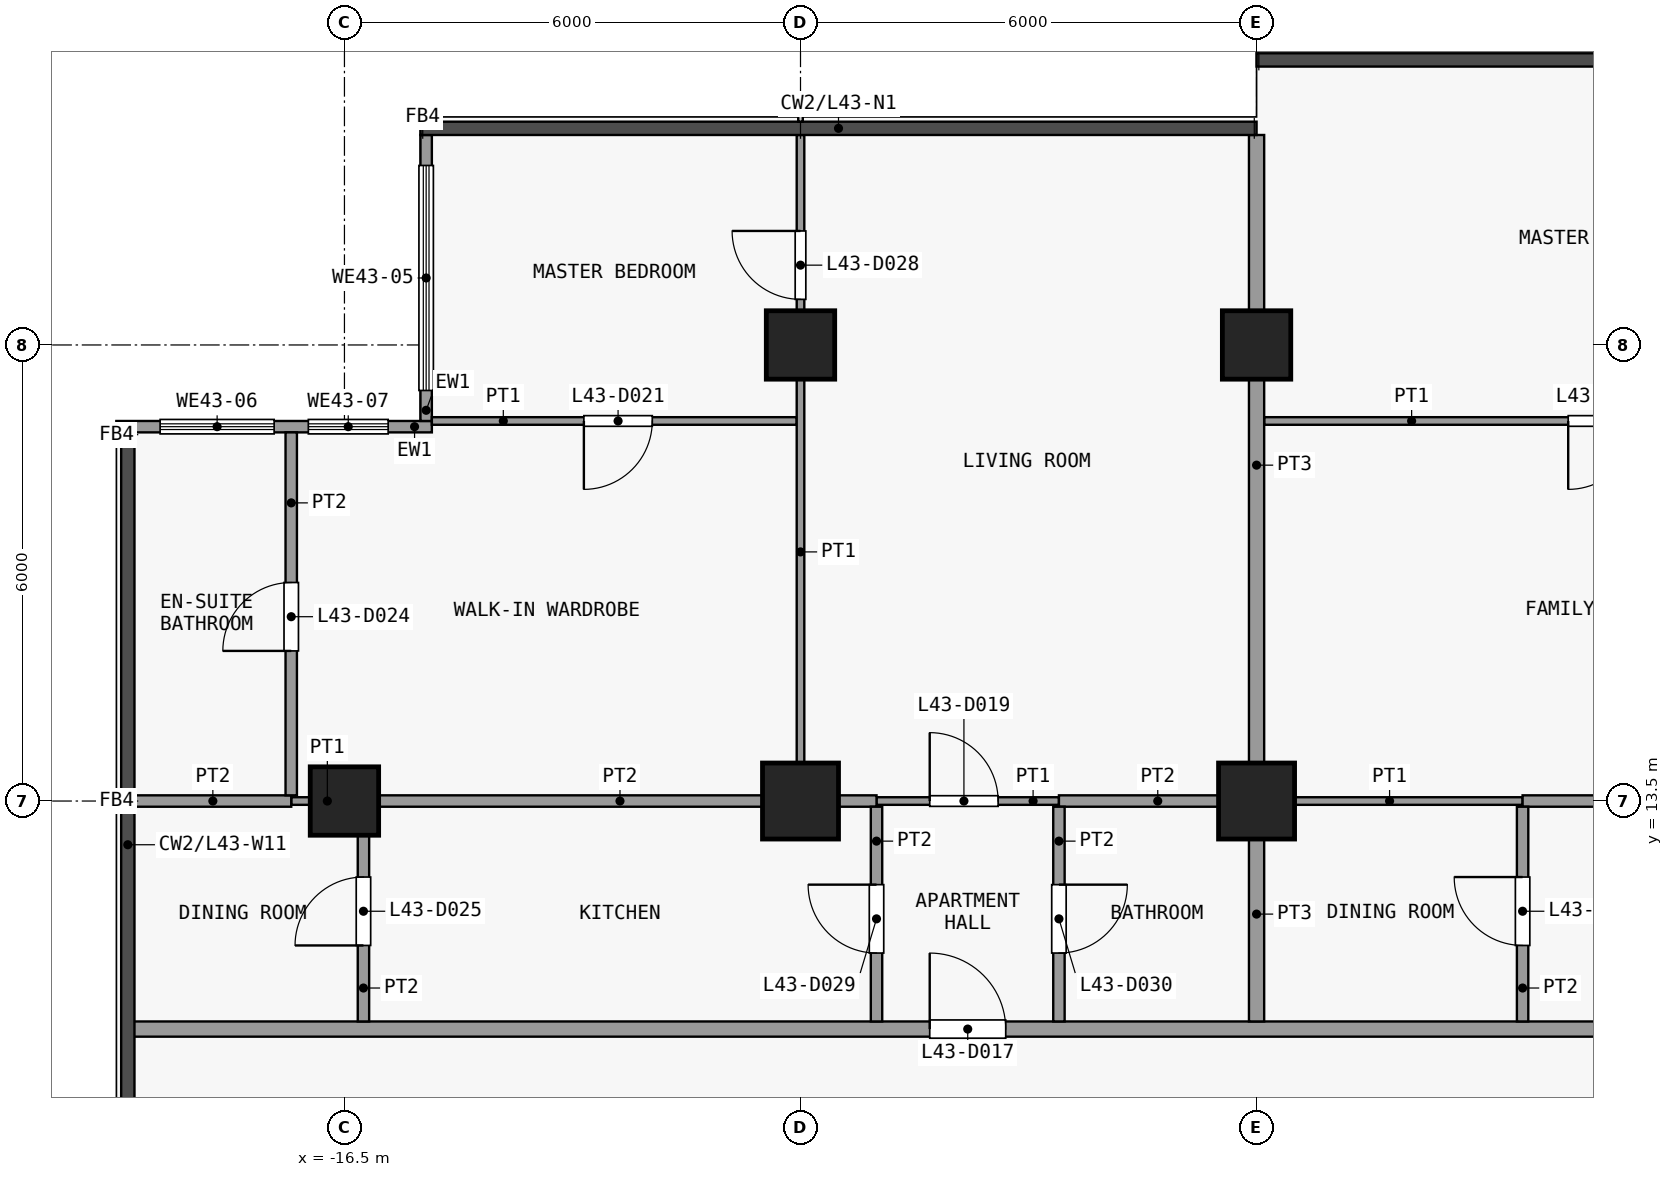
"""IFC4 building model, lengths in metres.
Left out: names, types, materials, properties, quantities, classifications, styles, units other than length and angle.
Written with IfcOpenShell. Run it as: python <this file> out.ifc"""

import sys

from ifc_helpers import new_model, si_unit, direction, frame, frame_2d, origin, origin_2d, place, context, subcontext, project, spatial, rectangle, extrude, element, fill, save


model = new_model("IFC4")
c1 = context("Model", 3, precision=1e-05, world=origin(), true_north=direction((0.0, 1.0)))
c2 = subcontext(c1, "Body", "Model", "MODEL_VIEW")
j1 = project(units=[si_unit("LENGTHUNIT", "METRE"), si_unit("PLANEANGLEUNIT", "RADIAN")], contexts=[c1])
p1 = place(None, origin())
s1 = spatial("IfcSite", under=j1, at=p1, CompositionType="ELEMENT")
p2 = place(p1, origin())
s2 = spatial("IfcBuilding", under=s1, at=p2, CompositionType="ELEMENT")
p3 = place(p2, frame((0.0, 0.0, 174.5)))
s3 = spatial("IfcBuildingStorey", under=s2, at=p3, CompositionType="ELEMENT", Elevation=174.5)
p4 = place(p3, frame((-16.5, 13.5, 0.0), z_axis=(0.0, 0.0, 1.0), x_axis=(1.0, 0.0, 0.0)))
e1 = element("IfcColumn", 1, at=p4, inside=s3, PredefinedType="COLUMN", context=c2, shape_type="SweptSolid", body=[
    extrude(rectangle(XDim=0.9, YDim=0.9, at=origin_2d()), origin(), (0.0, 0.0, 1.0), 3.6),
])
p5 = place(p3, frame((-10.5, 13.5, 0.0), z_axis=(0.0, 0.0, 1.0), x_axis=(1.0, 0.0, 0.0)))
e2 = element("IfcColumn", 2, at=p5, inside=s3, PredefinedType="COLUMN", context=c2, shape_type="SweptSolid", body=[
    extrude(rectangle(XDim=1.0, YDim=1.0, at=origin_2d()), origin(), (0.0, 0.0, 1.0), 3.6),
])
p6 = place(p3, frame((-10.5, 19.5, 0.0), z_axis=(0.0, 0.0, 1.0), x_axis=(1.0, 0.0, 0.0)))
e3 = element("IfcColumn", 3, at=p6, inside=s3, PredefinedType="COLUMN", context=c2, shape_type="SweptSolid", body=[
    extrude(rectangle(XDim=0.9, YDim=0.9, at=origin_2d()), origin(), (0.0, 0.0, 1.0), 3.6),
])
p7 = place(p3, frame((-4.5, 13.5, 0.0), z_axis=(0.0, 0.0, 1.0), x_axis=(1.0, 0.0, 0.0)))
e4 = element("IfcColumn", 4, at=p7, inside=s3, PredefinedType="COLUMN", context=c2, shape_type="SweptSolid", body=[
    extrude(rectangle(XDim=1.0, YDim=1.0, at=origin_2d()), origin(), (0.0, 0.0, 1.0), 3.6),
])
p8 = place(p3, frame((-4.5, 19.5, 0.0), z_axis=(0.0, 0.0, 1.0), x_axis=(1.0, 0.0, 0.0)))
e5 = element("IfcColumn", 5, at=p8, inside=s3, PredefinedType="COLUMN", context=c2, shape_type="SweptSolid", body=[
    extrude(rectangle(XDim=0.9, YDim=0.9, at=origin_2d()), origin(), (0.0, 0.0, 1.0), 3.6),
])
p9 = place(p3, frame((-15.425, 18.5, 0.0), z_axis=(0.0, 0.0, 1.0), x_axis=(0.0, 1.0, 0.0)))
e6 = element("IfcWall", 6, at=p9, inside=s3, PredefinedType="SOLIDWALL", context=c2, shape_type="SweptSolid", body=[
    extrude(rectangle(XDim=3.762, YDim=0.15, at=frame_2d((1.881, 0.0))), origin(), (0.0, 0.0, 1.0), 3.3),
])
p10 = place(p9, frame((0.401, 0.0, 0.9)))
e7 = element("IfcOpeningElement", 7, at=p10, cuts=e6, PredefinedType="OPENING", context=c2, shape_type="SweptSolid", body=[
    extrude(rectangle(XDim=2.96, YDim=2.4, at=frame_2d((1.48, 1.2))), frame((0.0, 0.085, 0.0), z_axis=(0.0, -1.0, 0.0), x_axis=(1.0, 0.0, 0.0)), (0.0, 0.0, 1.0), 0.17),
])
p11 = place(p3, frame((-19.5, 18.425, 0.0), z_axis=(0.0, 0.0, 1.0), x_axis=(1.0, 0.0, 0.0)))
e8 = element("IfcWall", 8, at=p11, inside=s3, PredefinedType="SOLIDWALL", context=c2, shape_type="SweptSolid", body=[
    extrude(rectangle(XDim=4.15, YDim=0.15, at=frame_2d((2.075, 0.0))), origin(), (0.0, 0.0, 1.0), 3.3),
])
p12 = place(p11, frame((0.575, 0.0, 0.9)))
e9 = element("IfcOpeningElement", 9, at=p12, cuts=e8, PredefinedType="OPENING", context=c2, shape_type="SweptSolid", body=[
    extrude(rectangle(XDim=1.5, YDim=2.4, at=frame_2d((0.75, 1.2))), frame((0.0, 0.085, 0.0), z_axis=(0.0, -1.0, 0.0), x_axis=(1.0, 0.0, 0.0)), (0.0, 0.0, 1.0), 0.17),
])
p13 = place(p11, frame((2.525, 0.0, 0.9)))
e10 = element("IfcOpeningElement", 10, at=p13, cuts=e8, PredefinedType="OPENING", context=c2, shape_type="SweptSolid", body=[
    extrude(rectangle(XDim=1.05, YDim=2.4, at=frame_2d((0.525, 1.2))), frame((0.0, 0.085, 0.0), z_axis=(0.0, -1.0, 0.0), x_axis=(1.0, 0.0, 0.0)), (0.0, 0.0, 1.0), 0.17),
])
p14 = place(p3, frame((-19.35, 10.5, 0.0), z_axis=(0.0, 0.0, 1.0), x_axis=(1.0, 0.0, 0.0)))
e11 = element("IfcWall", 11, at=p14, inside=s3, PredefinedType="PARTITIONING", context=c2, shape_type="SweptSolid", body=[
    extrude(rectangle(XDim=38.7, YDim=0.2, at=frame_2d((19.35, 0.0))), origin(), (0.0, 0.0, 1.0), 3.3),
])
p15 = place(p14, frame((10.55, 0.0, 0.0)))
e12 = element("IfcOpeningElement", 12, at=p15, cuts=e11, PredefinedType="OPENING", context=c2, shape_type="SweptSolid", body=[
    extrude(rectangle(XDim=1.0, YDim=2.1, at=frame_2d((0.5, 1.05))), frame((0.0, 0.11, 0.0), z_axis=(0.0, -1.0, 0.0), x_axis=(1.0, 0.0, 0.0)), (0.0, 0.0, 1.0), 0.22),
])
p16 = place(p14, frame((24.55, 0.0, 0.0)))
e13 = element("IfcOpeningElement", 13, at=p16, cuts=e11, PredefinedType="OPENING", context=c2, shape_type="SweptSolid", body=[
    extrude(rectangle(XDim=1.0, YDim=2.1, at=frame_2d((0.5, 1.05))), frame((0.0, 0.11, 0.0), z_axis=(0.0, -1.0, 0.0), x_axis=(1.0, 0.0, 0.0)), (0.0, 0.0, 1.0), 0.22),
])
p17 = place(p3, frame((-17.2, 13.5, 0.0), z_axis=(0.0, 0.0, 1.0), x_axis=(1.0, 0.0, 0.0)))
e14 = element("IfcWall", 14, at=p17, inside=s3, PredefinedType="PARTITIONING", context=c2, shape_type="SweptSolid", body=[
    extrude(rectangle(XDim=0.95, YDim=0.1, at=frame_2d((0.475, 0.0))), origin(), (0.0, 0.0, 1.0), 3.3),
])
p18 = place(p3, frame((-9.5, 13.5, 0.0), z_axis=(0.0, 0.0, 1.0), x_axis=(1.0, 0.0, 0.0)))
e15 = element("IfcWall", 15, at=p18, inside=s3, PredefinedType="PARTITIONING", context=c2, shape_type="SweptSolid", body=[
    extrude(rectangle(XDim=2.4, YDim=0.1, at=frame_2d((1.2, 0.0))), origin(), (0.0, 0.0, 1.0), 3.3),
])
p19 = place(p18, frame((0.7, 0.0, 0.0)))
e16 = element("IfcOpeningElement", 16, at=p19, cuts=e15, PredefinedType="OPENING", context=c2, shape_type="SweptSolid", body=[
    extrude(rectangle(XDim=0.9, YDim=2.1, at=frame_2d((0.45, 1.05))), frame((0.0, 0.06, 0.0), z_axis=(0.0, -1.0, 0.0), x_axis=(1.0, 0.0, 0.0)), (0.0, 0.0, 1.0), 0.12),
])
p20 = place(p3, frame((-4.5, 13.5, 0.0), z_axis=(0.0, 0.0, 1.0), x_axis=(1.0, 0.0, 0.0)))
e17 = element("IfcWall", 17, at=p20, inside=s3, PredefinedType="PARTITIONING", context=c2, shape_type="SweptSolid", body=[
    extrude(rectangle(XDim=3.5, YDim=0.1, at=frame_2d((1.75, 0.0))), origin(), (0.0, 0.0, 1.0), 3.3),
])
p21 = place(p3, frame((-19.262, 13.5, 0.0), z_axis=(0.0, 0.0, 1.0), x_axis=(1.0, 0.0, 0.0)))
e18 = element("IfcWall", 18, at=p21, inside=s3, PredefinedType="PARTITIONING", context=c2, shape_type="SweptSolid", body=[
    extrude(rectangle(XDim=2.062, YDim=0.15, at=frame_2d((1.031, 0.0))), origin(), (0.0, 0.0, 1.0), 3.3),
])
p22 = place(p3, frame((-16.25, 13.5, 0.0), z_axis=(0.0, 0.0, 1.0), x_axis=(1.0, 0.0, 0.0)))
e19 = element("IfcWall", 19, at=p22, inside=s3, PredefinedType="PARTITIONING", context=c2, shape_type="SweptSolid", body=[
    extrude(rectangle(XDim=6.75, YDim=0.15, at=frame_2d((3.375, 0.0))), origin(), (0.0, 0.0, 1.0), 3.3),
])
p23 = place(p3, frame((-7.1, 13.5, 0.0), z_axis=(0.0, 0.0, 1.0), x_axis=(1.0, 0.0, 0.0)))
e20 = element("IfcWall", 20, at=p23, inside=s3, PredefinedType="PARTITIONING", context=c2, shape_type="SweptSolid", body=[
    extrude(rectangle(XDim=2.6, YDim=0.15, at=frame_2d((1.3, 0.0))), origin(), (0.0, 0.0, 1.0), 3.3),
])
p24 = place(p3, frame((-1.0, 13.5, 0.0), z_axis=(0.0, 0.0, 1.0), x_axis=(1.0, 0.0, 0.0)))
e21 = element("IfcWall", 21, at=p24, inside=s3, PredefinedType="PARTITIONING", context=c2, shape_type="SweptSolid", body=[
    extrude(rectangle(XDim=5.5, YDim=0.15, at=frame_2d((2.75, 0.0))), origin(), (0.0, 0.0, 1.0), 3.3),
])
p25 = place(p3, frame((-15.35, 18.5, 0.0), z_axis=(0.0, 0.0, 1.0), x_axis=(1.0, 0.0, 0.0)))
e22 = element("IfcWall", 22, at=p25, inside=s3, PredefinedType="PARTITIONING", context=c2, shape_type="SweptSolid", body=[
    extrude(rectangle(XDim=4.8, YDim=0.1, at=frame_2d((2.4, 0.0))), origin(), (0.0, 0.0, 1.0), 3.3),
])
p26 = place(p25, frame((2.0, 0.0, 0.0)))
e23 = element("IfcOpeningElement", 23, at=p26, cuts=e22, PredefinedType="OPENING", context=c2, shape_type="SweptSolid", body=[
    extrude(rectangle(XDim=0.9, YDim=2.1, at=frame_2d((0.45, 1.05))), frame((0.0, 0.06, 0.0), z_axis=(0.0, -1.0, 0.0), x_axis=(1.0, 0.0, 0.0)), (0.0, 0.0, 1.0), 0.12),
])
p27 = place(p3, frame((-4.4, 18.5, 0.0), z_axis=(0.0, 0.0, 1.0), x_axis=(1.0, 0.0, 0.0)))
e24 = element("IfcWall", 24, at=p27, inside=s3, PredefinedType="PARTITIONING", context=c2, shape_type="SweptSolid", body=[
    extrude(rectangle(XDim=8.85, YDim=0.1, at=frame_2d((4.425, 0.0))), origin(), (0.0, 0.0, 1.0), 3.3),
])
p28 = place(p27, frame((4.0, 0.0, 0.0)))
e25 = element("IfcOpeningElement", 25, at=p28, cuts=e24, PredefinedType="OPENING", context=c2, shape_type="SweptSolid", body=[
    extrude(rectangle(XDim=0.9, YDim=2.1, at=frame_2d((0.45, 1.05))), frame((0.0, 0.06, 0.0), z_axis=(0.0, -1.0, 0.0), x_axis=(1.0, 0.0, 0.0)), (0.0, 0.0, 1.0), 0.12),
])
p29 = place(p3, frame((-17.2, 13.575, 0.0), z_axis=(0.0, 0.0, 1.0), x_axis=(0.0, 1.0, 0.0)))
e26 = element("IfcWall", 26, at=p29, inside=s3, PredefinedType="PARTITIONING", context=c2, shape_type="SweptSolid", body=[
    extrude(rectangle(XDim=4.775, YDim=0.15, at=frame_2d((2.388, 0.0))), origin(), (0.0, 0.0, 1.0), 3.3),
])
p30 = place(p29, frame((1.9, 0.0, 0.0)))
e27 = element("IfcOpeningElement", 27, at=p30, cuts=e26, PredefinedType="OPENING", context=c2, shape_type="SweptSolid", body=[
    extrude(rectangle(XDim=0.9, YDim=2.1, at=frame_2d((0.45, 1.05))), frame((0.0, 0.085, 0.0), z_axis=(0.0, -1.0, 0.0), x_axis=(1.0, 0.0, 0.0)), (0.0, 0.0, 1.0), 0.17),
])
p31 = place(p3, frame((-16.25, 10.6, 0.0), z_axis=(0.0, 0.0, 1.0), x_axis=(0.0, 1.0, 0.0)))
e28 = element("IfcWall", 28, at=p31, inside=s3, PredefinedType="PARTITIONING", context=c2, shape_type="SweptSolid", body=[
    extrude(rectangle(XDim=2.825, YDim=0.15, at=frame_2d((1.413, 0.0))), origin(), (0.0, 0.0, 1.0), 3.3),
])
p32 = place(p31, frame((1.0, 0.0, 0.0)))
e29 = element("IfcOpeningElement", 29, at=p32, cuts=e28, PredefinedType="OPENING", context=c2, shape_type="SweptSolid", body=[
    extrude(rectangle(XDim=0.9, YDim=2.1, at=frame_2d((0.45, 1.05))), frame((0.0, 0.085, 0.0), z_axis=(0.0, -1.0, 0.0), x_axis=(1.0, 0.0, 0.0)), (0.0, 0.0, 1.0), 0.17),
])
p33 = place(p3, frame((-10.5, 13.575, 0.0), z_axis=(0.0, 0.0, 1.0), x_axis=(0.0, 1.0, 0.0)))
e30 = element("IfcWall", 30, at=p33, inside=s3, PredefinedType="PARTITIONING", context=c2, shape_type="SweptSolid", body=[
    extrude(rectangle(XDim=8.688, YDim=0.1, at=frame_2d((4.344, 0.0))), origin(), (0.0, 0.0, 1.0), 3.3),
])
p34 = place(p33, frame((6.525, 0.0, 0.0)))
e31 = element("IfcOpeningElement", 31, at=p34, cuts=e30, PredefinedType="OPENING", context=c2, shape_type="SweptSolid", body=[
    extrude(rectangle(XDim=0.9, YDim=2.1, at=frame_2d((0.45, 1.05))), frame((0.0, 0.06, 0.0), z_axis=(0.0, -1.0, 0.0), x_axis=(1.0, 0.0, 0.0)), (0.0, 0.0, 1.0), 0.12),
])
p35 = place(p3, frame((-9.5, 10.6, 0.0), z_axis=(0.0, 0.0, 1.0), x_axis=(0.0, 1.0, 0.0)))
e32 = element("IfcWall", 32, at=p35, inside=s3, PredefinedType="PARTITIONING", context=c2, shape_type="SweptSolid", body=[
    extrude(rectangle(XDim=2.825, YDim=0.15, at=frame_2d((1.413, 0.0))), origin(), (0.0, 0.0, 1.0), 3.3),
])
p36 = place(p35, frame((0.9, 0.0, 0.0)))
e33 = element("IfcOpeningElement", 33, at=p36, cuts=e32, PredefinedType="OPENING", context=c2, shape_type="SweptSolid", body=[
    extrude(rectangle(XDim=0.9, YDim=2.1, at=frame_2d((0.45, 1.05))), frame((0.0, 0.085, 0.0), z_axis=(0.0, -1.0, 0.0), x_axis=(1.0, 0.0, 0.0)), (0.0, 0.0, 1.0), 0.17),
])
p37 = place(p3, frame((-7.1, 10.6, 0.0), z_axis=(0.0, 0.0, 1.0), x_axis=(0.0, 1.0, 0.0)))
e34 = element("IfcWall", 34, at=p37, inside=s3, PredefinedType="PARTITIONING", context=c2, shape_type="SweptSolid", body=[
    extrude(rectangle(XDim=2.825, YDim=0.15, at=frame_2d((1.413, 0.0))), origin(), (0.0, 0.0, 1.0), 3.3),
])
p38 = place(p37, frame((0.9, 0.0, 0.0)))
e35 = element("IfcOpeningElement", 35, at=p38, cuts=e34, PredefinedType="OPENING", context=c2, shape_type="SweptSolid", body=[
    extrude(rectangle(XDim=0.9, YDim=2.1, at=frame_2d((0.45, 1.05))), frame((0.0, 0.085, 0.0), z_axis=(0.0, -1.0, 0.0), x_axis=(1.0, 0.0, 0.0)), (0.0, 0.0, 1.0), 0.17),
])
p39 = place(p3, frame((-4.5, 10.6, 0.0), z_axis=(0.0, 0.0, 1.0), x_axis=(0.0, 1.0, 0.0)))
e36 = element("IfcWall", 36, at=p39, inside=s3, PredefinedType="PARTITIONING", context=c2, shape_type="SweptSolid", body=[
    extrude(rectangle(XDim=2.825, YDim=0.2, at=frame_2d((1.413, 0.0))), origin(), (0.0, 0.0, 1.0), 3.3),
])
p40 = place(p3, frame((-4.5, 13.575, 0.0), z_axis=(0.0, 0.0, 1.0), x_axis=(0.0, 1.0, 0.0)))
e37 = element("IfcWall", 37, at=p40, inside=s3, PredefinedType="PARTITIONING", context=c2, shape_type="SweptSolid", body=[
    extrude(rectangle(XDim=8.688, YDim=0.2, at=frame_2d((4.344, 0.0))), origin(), (0.0, 0.0, 1.0), 3.3),
])
p41 = place(p3, frame((-1.0, 10.6, 0.0), z_axis=(0.0, 0.0, 1.0), x_axis=(0.0, 1.0, 0.0)))
e38 = element("IfcWall", 38, at=p41, inside=s3, PredefinedType="PARTITIONING", context=c2, shape_type="SweptSolid", body=[
    extrude(rectangle(XDim=2.825, YDim=0.15, at=frame_2d((1.413, 0.0))), origin(), (0.0, 0.0, 1.0), 3.3),
])
p42 = place(p41, frame((1.0, 0.0, 0.0)))
e39 = element("IfcOpeningElement", 39, at=p42, cuts=e38, PredefinedType="OPENING", context=c2, shape_type="SweptSolid", body=[
    extrude(rectangle(XDim=0.9, YDim=2.1, at=frame_2d((0.45, 1.05))), frame((0.0, 0.085, 0.0), z_axis=(0.0, -1.0, 0.0), x_axis=(1.0, 0.0, 0.0)), (0.0, 0.0, 1.0), 0.17),
])
p43 = place(p10, origin())
e40 = element("IfcWindow", 40, at=p43, inside=s3, PartitioningType="SINGLE_PANEL", PredefinedType="WINDOW", context=c2, shape_type="SweptSolid", body=[
    extrude(rectangle(XDim=2.96, YDim=2.4, at=frame_2d((1.48, 1.2))), frame((0.0, 0.03, 0.0), z_axis=(0.0, -1.0, 0.0), x_axis=(1.0, 0.0, 0.0)), (0.0, 0.0, 1.0), 0.06),
])
fill(e7, e40)
p44 = place(p12, origin())
e41 = element("IfcWindow", 41, at=p44, inside=s3, PartitioningType="SINGLE_PANEL", PredefinedType="WINDOW", context=c2, shape_type="SweptSolid", body=[
    extrude(rectangle(XDim=1.5, YDim=2.4, at=frame_2d((0.75, 1.2))), frame((0.0, 0.03, 0.0), z_axis=(0.0, -1.0, 0.0), x_axis=(1.0, 0.0, 0.0)), (0.0, 0.0, 1.0), 0.06),
])
fill(e9, e41)
p45 = place(p13, origin())
e42 = element("IfcWindow", 42, at=p45, inside=s3, PartitioningType="SINGLE_PANEL", PredefinedType="WINDOW", context=c2, shape_type="SweptSolid", body=[
    extrude(rectangle(XDim=1.05, YDim=2.4, at=frame_2d((0.525, 1.2))), frame((0.0, 0.03, 0.0), z_axis=(0.0, -1.0, 0.0), x_axis=(1.0, 0.0, 0.0)), (0.0, 0.0, 1.0), 0.06),
])
fill(e10, e42)
p46 = place(p15, origin())
e43 = element("IfcDoor", 43, at=p46, inside=s3, OperationType="SINGLE_SWING_RIGHT", PredefinedType="DOOR", context=c2, shape_type="SweptSolid", body=[
    extrude(rectangle(XDim=1.0, YDim=2.1, at=frame_2d((0.5, 1.05))), frame((0.0, 0.025, 0.0), z_axis=(0.0, -1.0, 0.0), x_axis=(1.0, 0.0, 0.0)), (0.0, 0.0, 1.0), 0.05),
])
fill(e12, e43)
p47 = place(p19, origin())
e44 = element("IfcDoor", 44, at=p47, inside=s3, OperationType="SINGLE_SWING_RIGHT", PredefinedType="DOOR", context=c2, shape_type="SweptSolid", body=[
    extrude(rectangle(XDim=0.9, YDim=2.1, at=frame_2d((0.45, 1.05))), frame((0.0, 0.025, 0.0), z_axis=(0.0, -1.0, 0.0), x_axis=(1.0, 0.0, 0.0)), (0.0, 0.0, 1.0), 0.05),
])
fill(e16, e44)
p48 = place(p26, origin())
e45 = element("IfcDoor", 45, at=p48, inside=s3, OperationType="SINGLE_SWING_LEFT", PredefinedType="DOOR", context=c2, shape_type="SweptSolid", body=[
    extrude(rectangle(XDim=0.9, YDim=2.1, at=frame_2d((0.45, 1.05))), frame((0.0, 0.025, 0.0), z_axis=(0.0, -1.0, 0.0), x_axis=(1.0, 0.0, 0.0)), (0.0, 0.0, 1.0), 0.05),
])
fill(e23, e45)
p49 = place(p28, origin())
e46 = element("IfcDoor", 46, at=p49, inside=s3, OperationType="SINGLE_SWING_LEFT", PredefinedType="DOOR", context=c2, shape_type="SweptSolid", body=[
    extrude(rectangle(XDim=0.9, YDim=2.1, at=frame_2d((0.45, 1.05))), frame((0.0, 0.025, 0.0), z_axis=(0.0, -1.0, 0.0), x_axis=(1.0, 0.0, 0.0)), (0.0, 0.0, 1.0), 0.05),
])
fill(e25, e46)
p50 = place(p30, origin())
e47 = element("IfcDoor", 47, at=p50, inside=s3, OperationType="SINGLE_SWING_RIGHT", PredefinedType="DOOR", context=c2, shape_type="SweptSolid", body=[
    extrude(rectangle(XDim=0.9, YDim=2.1, at=frame_2d((0.45, 1.05))), frame((0.0, 0.025, 0.0), z_axis=(0.0, -1.0, 0.0), x_axis=(1.0, 0.0, 0.0)), (0.0, 0.0, 1.0), 0.05),
])
fill(e27, e47)
p51 = place(p32, origin())
e48 = element("IfcDoor", 48, at=p51, inside=s3, OperationType="SINGLE_SWING_RIGHT", PredefinedType="DOOR", context=c2, shape_type="SweptSolid", body=[
    extrude(rectangle(XDim=0.9, YDim=2.1, at=frame_2d((0.45, 1.05))), frame((0.0, 0.025, 0.0), z_axis=(0.0, -1.0, 0.0), x_axis=(1.0, 0.0, 0.0)), (0.0, 0.0, 1.0), 0.05),
])
fill(e29, e48)
p52 = place(p34, origin())
e49 = element("IfcDoor", 49, at=p52, inside=s3, OperationType="SINGLE_SWING_LEFT", PredefinedType="DOOR", context=c2, shape_type="SweptSolid", body=[
    extrude(rectangle(XDim=0.9, YDim=2.1, at=frame_2d((0.45, 1.05))), frame((0.0, 0.025, 0.0), z_axis=(0.0, -1.0, 0.0), x_axis=(1.0, 0.0, 0.0)), (0.0, 0.0, 1.0), 0.05),
])
fill(e31, e49)
p53 = place(p36, origin())
e50 = element("IfcDoor", 50, at=p53, inside=s3, OperationType="SINGLE_SWING_LEFT", PredefinedType="DOOR", context=c2, shape_type="SweptSolid", body=[
    extrude(rectangle(XDim=0.9, YDim=2.1, at=frame_2d((0.45, 1.05))), frame((0.0, 0.025, 0.0), z_axis=(0.0, -1.0, 0.0), x_axis=(1.0, 0.0, 0.0)), (0.0, 0.0, 1.0), 0.05),
])
fill(e33, e50)
p54 = place(p38, origin())
e51 = element("IfcDoor", 51, at=p54, inside=s3, OperationType="SINGLE_SWING_RIGHT", PredefinedType="DOOR", context=c2, shape_type="SweptSolid", body=[
    extrude(rectangle(XDim=0.9, YDim=2.1, at=frame_2d((0.45, 1.05))), frame((0.0, 0.025, 0.0), z_axis=(0.0, -1.0, 0.0), x_axis=(1.0, 0.0, 0.0)), (0.0, 0.0, 1.0), 0.05),
])
fill(e35, e51)
p55 = place(p42, origin())
e52 = element("IfcDoor", 52, at=p55, inside=s3, OperationType="SINGLE_SWING_LEFT", PredefinedType="DOOR", context=c2, shape_type="SweptSolid", body=[
    extrude(rectangle(XDim=0.9, YDim=2.1, at=frame_2d((0.45, 1.05))), frame((0.0, 0.025, 0.0), z_axis=(0.0, -1.0, 0.0), x_axis=(1.0, 0.0, 0.0)), (0.0, 0.0, 1.0), 0.05),
])
fill(e39, e52)
save(model, sys.argv[1])
